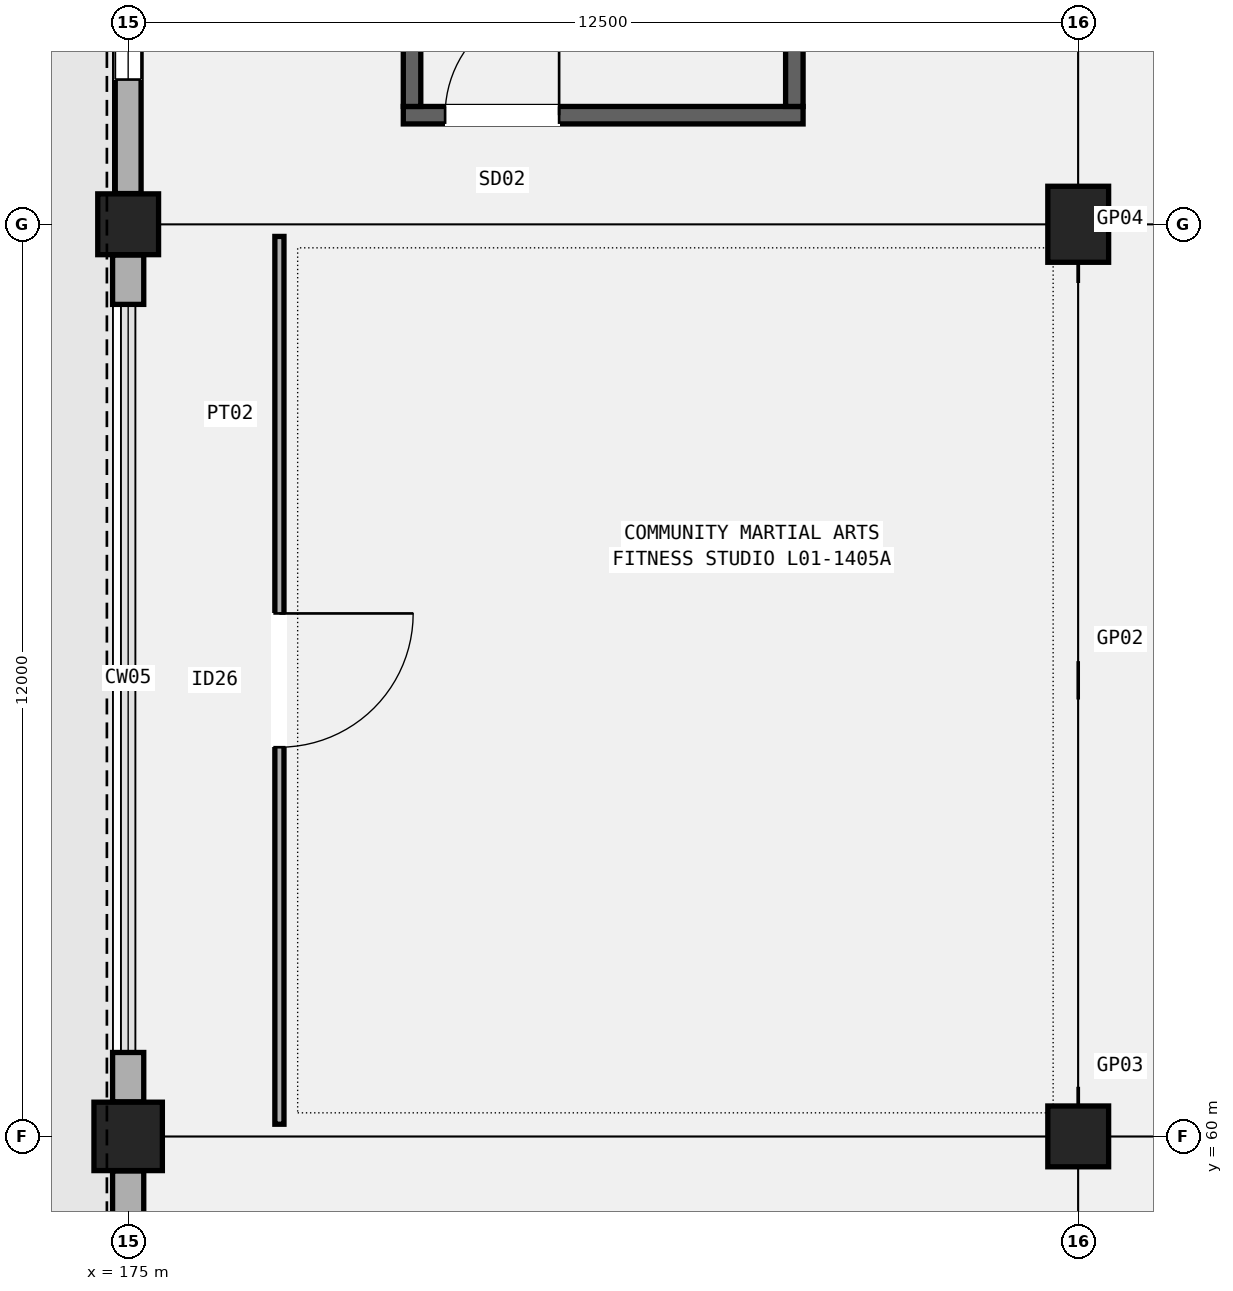
"""IFC4 building model, lengths in metres.
Left out: names, types, materials, properties, quantities, classifications, styles, units other than length and angle.
Written with IfcOpenShell. Run it as: python <this file> out.ifc"""

import sys

from ifc_helpers import new_model, si_unit, direction, frame, frame_2d, origin, origin_2d, place, context, subcontext, project, spatial, rectangle, extrude, element, fill, save


model = new_model("IFC4")
c1 = context("Model", 3, precision=1e-05, world=origin(), true_north=direction((0.0, 1.0)))
c2 = subcontext(c1, "Body", "Model", "MODEL_VIEW")
j1 = project(units=[si_unit("LENGTHUNIT", "METRE"), si_unit("PLANEANGLEUNIT", "RADIAN")], contexts=[c1])
p1 = place(None, origin())
s1 = spatial("IfcSite", under=j1, at=p1, CompositionType="ELEMENT")
p2 = place(p1, origin())
s2 = spatial("IfcBuilding", under=s1, at=p2, CompositionType="ELEMENT")
p3 = place(p2, frame((0.0, 0.0, 5.4)))
s3 = spatial("IfcBuildingStorey", under=s2, at=p3, CompositionType="ELEMENT", Elevation=5.4)
p4 = place(p3, frame((175.0, 60.0, 0.0), z_axis=(0.0, 0.0, 1.0), x_axis=(1.0, 0.0, 0.0)))
e1 = element("IfcColumn", 1, at=p4, inside=s3, PredefinedType="COLUMN", context=c2, shape_type="SweptSolid", body=[
    extrude(rectangle(XDim=0.9, YDim=0.9, at=origin_2d()), origin(), (0.0, 0.0, 1.0), 4.8),
])
for number, where, z_axis, x_axis in (
    (2, (175.0, 72.0, 0.0), (0.0, 0.0, 1.0), (1.0, 0.0, 0.0)),
    (3, (187.5, 60.0, 0.0), (0.0, 0.0, 1.0), (1.0, 0.0, 0.0)),
):
    element("IfcColumn", number, at=place(p3, frame(where, z_axis=z_axis, x_axis=x_axis)), inside=s3, PredefinedType="COLUMN", context=c2, shape_type="SweptSolid", body=[
        extrude(rectangle(XDim=0.8, YDim=0.8, at=origin_2d()), origin(), (0.0, 0.0, 1.0), 4.8),
    ])
p5 = place(p3, frame((187.5, 72.0, 0.0), z_axis=(0.0, 0.0, 1.0), x_axis=(1.0, 0.0, 0.0)))
e4 = element("IfcColumn", 4, at=p5, inside=s3, PredefinedType="COLUMN", context=c2, shape_type="SweptSolid", body=[
    extrude(rectangle(XDim=0.8, YDim=1.0, at=origin_2d()), origin(), (0.0, 0.0, 1.0), 4.8),
])
p6 = place(p3, frame((175.0, 48.504, 0.0), z_axis=(0.0, 0.0, 1.0), x_axis=(0.0, 1.0, 0.0)))
e5 = element("IfcWall", 5, at=p6, inside=s3, PredefinedType="SOLIDWALL", context=c2, shape_type="SweptSolid", body=[
    extrude(rectangle(XDim=11.042, YDim=0.41, at=frame_2d((5.521, 0.0))), origin(), (0.0, 0.0, 1.0), 4.15),
])
p7 = place(p6, frame((1.5, 0.0, 0.95)))
e6 = element("IfcOpeningElement", 6, at=p7, cuts=e5, PredefinedType="OPENING", context=c2, shape_type="SweptSolid", body=[
    extrude(rectangle(XDim=2.1, YDim=2.6, at=frame_2d((1.05, 1.3))), frame((0.0, 0.215, 0.0), z_axis=(0.0, -1.0, 0.0), x_axis=(1.0, 0.0, 0.0)), (0.0, 0.0, 1.0), 0.43),
])
for number, where, z_axis, x_axis in (
    (7, (175.0, 60.454, 0.0), (0.0, 0.0, 1.0), (0.0, 1.0, 0.0)),
    (8, (175.0, 70.946, 0.0), (0.0, 0.0, 1.0), (0.0, 1.0, 0.0)),
):
    element("IfcWall", number, at=place(p3, frame(where, z_axis=z_axis, x_axis=x_axis)), inside=s3, PredefinedType="SOLIDWALL", context=c2, shape_type="SweptSolid", body=[
        extrude(rectangle(XDim=0.65, YDim=0.41, at=frame_2d((0.325, 0.0))), origin(), (0.0, 0.0, 1.0), 4.2),
    ])
p8 = place(p3, frame((175.0, 72.404, 0.0), z_axis=(0.0, 0.0, 1.0), x_axis=(0.0, 1.0, 0.0)))
e9 = element("IfcWall", 9, at=p8, inside=s3, PredefinedType="SOLIDWALL", context=c2, shape_type="SweptSolid", body=[
    extrude(rectangle(XDim=11.092, YDim=0.34, at=frame_2d((5.546, 0.0))), origin(), (0.0, 0.0, 1.0), 4.15),
])
p9 = place(p8, frame((1.5, 0.0, 0.95)))
e10 = element("IfcOpeningElement", 10, at=p9, cuts=e9, PredefinedType="OPENING", context=c2, shape_type="SweptSolid", body=[
    extrude(rectangle(XDim=2.25, YDim=1.8, at=frame_2d((1.125, 0.9))), frame((0.0, 0.18, 0.0), z_axis=(0.0, -1.0, 0.0), x_axis=(1.0, 0.0, 0.0)), (0.0, 0.0, 1.0), 0.36),
])
p10 = place(p3, frame((178.62, 73.435, 0.0), z_axis=(0.0, 0.0, 1.0), x_axis=(1.0, 0.0, 0.0)))
e11 = element("IfcWall", 11, at=p10, inside=s3, PredefinedType="SHEAR", context=c2, shape_type="SweptSolid", body=[
    extrude(rectangle(XDim=5.26, YDim=0.23, at=frame_2d((2.63, 0.0))), origin(), (0.0, 0.0, 1.0), 4.55),
])
p11 = place(p10, frame((0.55, 0.0, 0.0)))
e12 = element("IfcOpeningElement", 12, at=p11, cuts=e11, PredefinedType="OPENING", context=c2, shape_type="SweptSolid", body=[
    extrude(rectangle(XDim=1.5, YDim=2.2, at=frame_2d((0.75, 1.1))), frame((0.0, 0.125, 0.0), z_axis=(0.0, -1.0, 0.0), x_axis=(1.0, 0.0, 0.0)), (0.0, 0.0, 1.0), 0.25),
])
for number, where, z_axis, x_axis in (
    (13, (178.735, 73.55, 0.0), (0.0, 0.0, 1.0), (0.0, 1.0, 0.0)),
    (14, (183.765, 73.55, 0.0), (0.0, 0.0, 1.0), (0.0, 1.0, 0.0)),
):
    element("IfcWall", number, at=place(p3, frame(where, z_axis=z_axis, x_axis=x_axis)), inside=s3, PredefinedType="SHEAR", context=c2, shape_type="SweptSolid", body=[
        extrude(rectangle(XDim=8.9, YDim=0.23, at=frame_2d((4.45, 0.0))), origin(), (0.0, 0.0, 1.0), 4.55),
    ])
p12 = place(p3, frame((176.99, 60.16, 0.0), z_axis=(0.0, 0.0, 1.0), x_axis=(0.0, 1.0, 0.0)))
e15 = element("IfcWall", 15, at=p12, inside=s3, PredefinedType="PARTITIONING", context=c2, shape_type="SweptSolid", body=[
    extrude(rectangle(XDim=11.68, YDim=0.12, at=frame_2d((5.84, 0.0))), origin(), (0.0, 0.0, 1.0), 3.92),
])
p13 = place(p12, frame((6.72, 0.0, 0.0), z_axis=(0.0, 0.0, 1.0), x_axis=(-1.0, 0.0, 0.0)))
e16 = element("IfcOpeningElement", 16, at=p13, cuts=e15, PredefinedType="OPENING", context=c2, shape_type="SweptSolid", body=[
    extrude(rectangle(XDim=1.76, YDim=2.3, at=frame_2d((0.88, 1.15))), frame((0.0, 0.07, 0.0), z_axis=(0.0, -1.0, 0.0), x_axis=(1.0, 0.0, 0.0)), (0.0, 0.0, 1.0), 0.14),
])
p14 = place(p9, origin())
e17 = element("IfcWindow", 17, at=p14, inside=s3, PartitioningType="SINGLE_PANEL", PredefinedType="WINDOW", context=c2, shape_type="SweptSolid", body=[
    extrude(rectangle(XDim=2.25, YDim=1.8, at=frame_2d((1.125, 0.9))), frame((0.0, 0.03, 0.0), z_axis=(0.0, -1.0, 0.0), x_axis=(1.0, 0.0, 0.0)), (0.0, 0.0, 1.0), 0.06),
])
fill(e10, e17)
p15 = place(p11, origin())
e18 = element("IfcDoor", 18, at=p15, inside=s3, OperationType="SINGLE_SWING_RIGHT", PredefinedType="DOOR", context=c2, shape_type="SweptSolid", body=[
    extrude(rectangle(XDim=1.5, YDim=2.2, at=frame_2d((0.75, 1.1))), frame((0.0, 0.025, 0.0), z_axis=(0.0, -1.0, 0.0), x_axis=(1.0, 0.0, 0.0)), (0.0, 0.0, 1.0), 0.05),
])
fill(e12, e18)
p16 = place(p13, origin())
e19 = element("IfcDoor", 19, at=p16, inside=s3, OperationType="SINGLE_SWING_LEFT", PredefinedType="DOOR", context=c2, shape_type="SweptSolid", body=[
    extrude(rectangle(XDim=1.76, YDim=2.3, at=frame_2d((0.88, 1.15))), frame((0.0, 0.025, 0.0), z_axis=(0.0, -1.0, 0.0), x_axis=(1.0, 0.0, 0.0)), (0.0, 0.0, 1.0), 0.05),
])
fill(e16, e19)
save(model, sys.argv[1])
